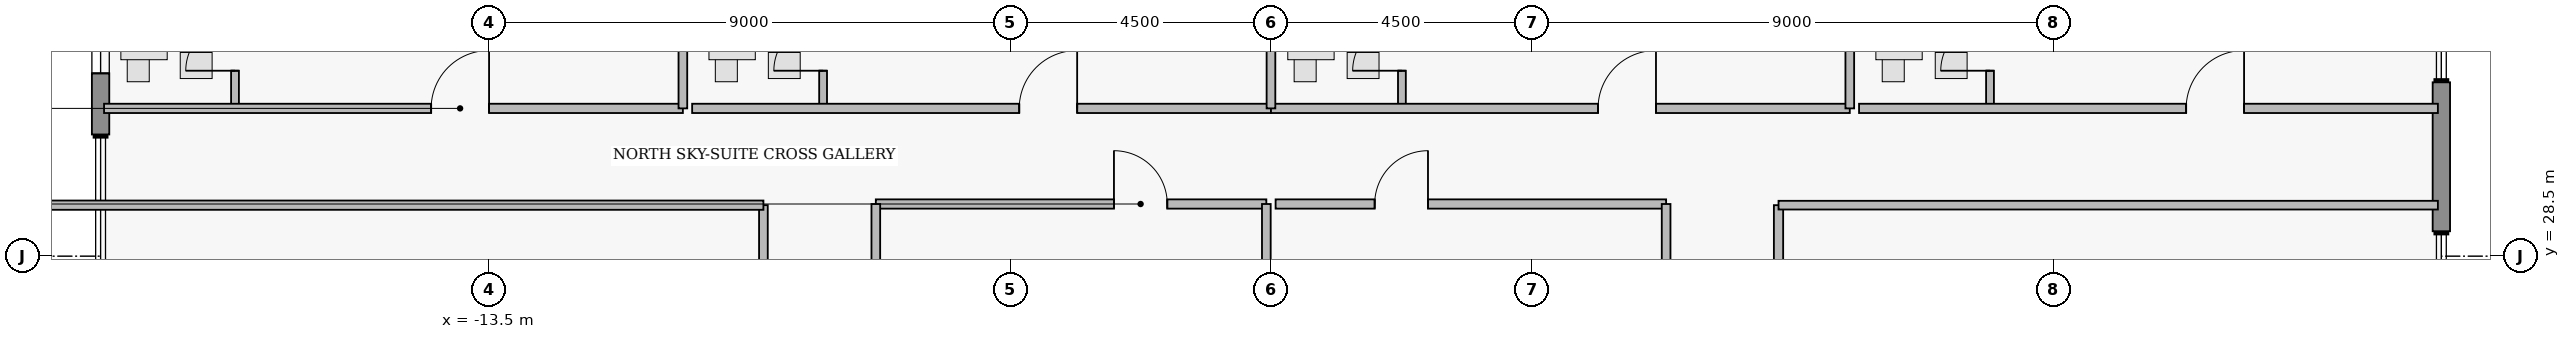
"""IFC4 building model, lengths in metres.
Left out: names, types, materials, properties, quantities, classifications, styles, units other than length and angle.
Written with IfcOpenShell. Run it as: python <this file> out.ifc"""

import sys

from ifc_helpers import new_model, si_unit, direction, frame, frame_2d, origin, place, context, subcontext, project, spatial, rectangle, extrude, element, fill, save


model = new_model("IFC4")
c1 = context("Model", 3, precision=1e-05, world=origin(), true_north=direction((0.0, 1.0)))
c2 = subcontext(c1, "Body", "Model", "MODEL_VIEW")
j1 = project(units=[si_unit("LENGTHUNIT", "METRE"), si_unit("PLANEANGLEUNIT", "RADIAN")], contexts=[c1])
p1 = place(None, origin())
s1 = spatial("IfcSite", under=j1, at=p1, CompositionType="ELEMENT")
p2 = place(p1, origin())
s2 = spatial("IfcBuilding", under=s1, at=p2, CompositionType="ELEMENT")
p3 = place(p2, frame((0.0, 0.0, 250.75)))
s3 = spatial("IfcBuildingStorey", under=s2, at=p3, CompositionType="ELEMENT", Elevation=250.75)
p4 = place(p3, frame((-20.2, 30.6, 0.0), z_axis=(0.0, 0.0, 1.0), x_axis=(0.0, 1.0, 0.0)))
e1 = element("IfcWall", 1, at=p4, inside=s3, PredefinedType="STANDARD", context=c2, shape_type="SweptSolid", body=[
    extrude(rectangle(XDim=5.0, YDim=0.3, at=frame_2d((2.5, 0.0))), origin(), (0.0, 0.0, 1.0), 3.48),
])
p5 = place(p4, frame((1.055, 0.0, 0.95)))
e2 = element("IfcOpeningElement", 2, at=p5, cuts=e1, PredefinedType="OPENING", context=c2, shape_type="SweptSolid", body=[
    extrude(rectangle(XDim=1.15, YDim=1.55, at=frame_2d((0.575, 0.775))), frame((0.0, 0.16, 0.0), z_axis=(0.0, -1.0, 0.0), x_axis=(1.0, 0.0, 0.0)), (0.0, 0.0, 1.0), 0.32),
])
p6 = place(p4, frame((3.27, 0.0, 0.95)))
e3 = element("IfcOpeningElement", 3, at=p6, cuts=e1, PredefinedType="OPENING", context=c2, shape_type="SweptSolid", body=[
    extrude(rectangle(XDim=1.15, YDim=1.55, at=frame_2d((0.575, 0.775))), frame((0.0, 0.16, 0.0), z_axis=(0.0, -1.0, 0.0), x_axis=(1.0, 0.0, 0.0)), (0.0, 0.0, 1.0), 0.32),
])
p7 = place(p3, frame((20.2, 31.5, 0.0), z_axis=(0.0, 0.0, 1.0), x_axis=(0.0, -1.0, 0.0)))
e4 = element("IfcWall", 4, at=p7, inside=s3, PredefinedType="STANDARD", context=c2, shape_type="SweptSolid", body=[
    extrude(rectangle(XDim=2.57, YDim=0.3, at=frame_2d((1.285, 0.0))), origin(), (0.0, 0.0, 1.0), 3.48),
])
p8 = place(p3, frame((-17.88, 31.05, 0.0), z_axis=(0.0, 0.0, 1.0), x_axis=(0.0, 1.0, 0.0)))
e5 = element("IfcWall", 5, at=p8, inside=s3, PredefinedType="PLUMBINGWALL", context=c2, shape_type="SweptSolid", body=[
    extrude(rectangle(XDim=2.36, YDim=0.135, at=frame_2d((1.18, 0.0))), origin(), (0.0, 0.0, 1.0), 3.48),
])
p9 = place(p8, frame((0.65, 0.0, 0.0)))
e6 = element("IfcOpeningElement", 6, at=p9, cuts=e5, PredefinedType="OPENING", context=c2, shape_type="SweptSolid", body=[
    extrude(rectangle(XDim=0.85, YDim=2.1, at=frame_2d((0.425, 1.05))), frame((0.0, 0.077, 0.0), z_axis=(0.0, -1.0, 0.0), x_axis=(1.0, 0.0, 0.0)), (0.0, 0.0, 1.0), 0.155),
])
p10 = place(p3, frame((-20.14, 31.05, 0.0), z_axis=(0.0, 0.0, 1.0), x_axis=(1.0, 0.0, 0.0)))
e7 = element("IfcWall", 7, at=p10, inside=s3, PredefinedType="PARTITIONING", context=c2, shape_type="SweptSolid", body=[
    extrude(rectangle(XDim=9.99, YDim=0.16, at=frame_2d((4.995, 0.0))), origin(), (0.0, 0.0, 1.0), 3.48),
])
p11 = place(p10, frame((5.645, 0.0, 0.0)))
e8 = element("IfcOpeningElement", 8, at=p11, cuts=e7, PredefinedType="OPENING", context=c2, shape_type="SweptSolid", body=[
    extrude(rectangle(XDim=1.0, YDim=2.15, at=frame_2d((0.5, 1.075))), frame((0.0, 0.09, 0.0), z_axis=(0.0, -1.0, 0.0), x_axis=(1.0, 0.0, 0.0)), (0.0, 0.0, 1.0), 0.18),
])
p12 = place(p3, frame((-7.73, 31.05, 0.0), z_axis=(0.0, 0.0, 1.0), x_axis=(0.0, 1.0, 0.0)))
e9 = element("IfcWall", 9, at=p12, inside=s3, PredefinedType="PLUMBINGWALL", context=c2, shape_type="SweptSolid", body=[
    extrude(rectangle(XDim=2.36, YDim=0.135, at=frame_2d((1.18, 0.0))), origin(), (0.0, 0.0, 1.0), 3.48),
])
p13 = place(p12, frame((0.65, 0.0, 0.0)))
e10 = element("IfcOpeningElement", 10, at=p13, cuts=e9, PredefinedType="OPENING", context=c2, shape_type="SweptSolid", body=[
    extrude(rectangle(XDim=0.85, YDim=2.1, at=frame_2d((0.425, 1.05))), frame((0.0, 0.077, 0.0), z_axis=(0.0, -1.0, 0.0), x_axis=(1.0, 0.0, 0.0)), (0.0, 0.0, 1.0), 0.155),
])
p14 = place(p3, frame((-9.99, 31.05, 0.0), z_axis=(0.0, 0.0, 1.0), x_axis=(1.0, 0.0, 0.0)))
e11 = element("IfcWall", 11, at=p14, inside=s3, PredefinedType="PARTITIONING", context=c2, shape_type="SweptSolid", body=[
    extrude(rectangle(XDim=9.99, YDim=0.16, at=frame_2d((4.995, 0.0))), origin(), (0.0, 0.0, 1.0), 3.48),
])
p15 = place(p14, frame((5.645, 0.0, 0.0)))
e12 = element("IfcOpeningElement", 12, at=p15, cuts=e11, PredefinedType="OPENING", context=c2, shape_type="SweptSolid", body=[
    extrude(rectangle(XDim=1.0, YDim=2.15, at=frame_2d((0.5, 1.075))), frame((0.0, 0.09, 0.0), z_axis=(0.0, -1.0, 0.0), x_axis=(1.0, 0.0, 0.0)), (0.0, 0.0, 1.0), 0.18),
])
p16 = place(p3, frame((2.26, 31.05, 0.0), z_axis=(0.0, 0.0, 1.0), x_axis=(0.0, 1.0, 0.0)))
e13 = element("IfcWall", 13, at=p16, inside=s3, PredefinedType="PLUMBINGWALL", context=c2, shape_type="SweptSolid", body=[
    extrude(rectangle(XDim=2.36, YDim=0.135, at=frame_2d((1.18, 0.0))), origin(), (0.0, 0.0, 1.0), 3.48),
])
p17 = place(p16, frame((0.65, 0.0, 0.0)))
e14 = element("IfcOpeningElement", 14, at=p17, cuts=e13, PredefinedType="OPENING", context=c2, shape_type="SweptSolid", body=[
    extrude(rectangle(XDim=0.85, YDim=2.1, at=frame_2d((0.425, 1.05))), frame((0.0, 0.077, 0.0), z_axis=(0.0, -1.0, 0.0), x_axis=(1.0, 0.0, 0.0)), (0.0, 0.0, 1.0), 0.155),
])
p18 = place(p3, frame((0.0, 31.05, 0.0), z_axis=(0.0, 0.0, 1.0), x_axis=(1.0, 0.0, 0.0)))
e15 = element("IfcWall", 15, at=p18, inside=s3, PredefinedType="PARTITIONING", context=c2, shape_type="SweptSolid", body=[
    extrude(rectangle(XDim=9.99, YDim=0.16, at=frame_2d((4.995, 0.0))), origin(), (0.0, 0.0, 1.0), 3.48),
])
p19 = place(p18, frame((5.645, 0.0, 0.0)))
e16 = element("IfcOpeningElement", 16, at=p19, cuts=e15, PredefinedType="OPENING", context=c2, shape_type="SweptSolid", body=[
    extrude(rectangle(XDim=1.0, YDim=2.15, at=frame_2d((0.5, 1.075))), frame((0.0, 0.09, 0.0), z_axis=(0.0, -1.0, 0.0), x_axis=(1.0, 0.0, 0.0)), (0.0, 0.0, 1.0), 0.18),
])
p20 = place(p3, frame((12.41, 31.05, 0.0), z_axis=(0.0, 0.0, 1.0), x_axis=(0.0, 1.0, 0.0)))
e17 = element("IfcWall", 17, at=p20, inside=s3, PredefinedType="PLUMBINGWALL", context=c2, shape_type="SweptSolid", body=[
    extrude(rectangle(XDim=2.36, YDim=0.135, at=frame_2d((1.18, 0.0))), origin(), (0.0, 0.0, 1.0), 3.48),
])
p21 = place(p20, frame((0.65, 0.0, 0.0)))
e18 = element("IfcOpeningElement", 18, at=p21, cuts=e17, PredefinedType="OPENING", context=c2, shape_type="SweptSolid", body=[
    extrude(rectangle(XDim=0.85, YDim=2.1, at=frame_2d((0.425, 1.05))), frame((0.0, 0.077, 0.0), z_axis=(0.0, -1.0, 0.0), x_axis=(1.0, 0.0, 0.0)), (0.0, 0.0, 1.0), 0.155),
])
p22 = place(p3, frame((10.15, 31.05, 0.0), z_axis=(0.0, 0.0, 1.0), x_axis=(1.0, 0.0, 0.0)))
e19 = element("IfcWall", 19, at=p22, inside=s3, PredefinedType="PARTITIONING", context=c2, shape_type="SweptSolid", body=[
    extrude(rectangle(XDim=9.99, YDim=0.16, at=frame_2d((4.995, 0.0))), origin(), (0.0, 0.0, 1.0), 3.48),
])
p23 = place(p22, frame((5.645, 0.0, 0.0)))
e20 = element("IfcOpeningElement", 20, at=p23, cuts=e19, PredefinedType="OPENING", context=c2, shape_type="SweptSolid", body=[
    extrude(rectangle(XDim=1.0, YDim=2.15, at=frame_2d((0.5, 1.075))), frame((0.0, 0.09, 0.0), z_axis=(0.0, -1.0, 0.0), x_axis=(1.0, 0.0, 0.0)), (0.0, 0.0, 1.0), 0.18),
])
p24 = place(p3, frame((-6.82, 29.4, 0.0), z_axis=(0.0, 0.0, 1.0), x_axis=(1.0, 0.0, 0.0)))
e21 = element("IfcWall", 21, at=p24, inside=s3, PredefinedType="PARTITIONING", context=c2, shape_type="SweptSolid", body=[
    extrude(rectangle(XDim=6.74, YDim=0.16, at=frame_2d((3.37, 0.0))), origin(), (0.0, 0.0, 1.0), 3.48),
])
p25 = place(p24, frame((4.11, 0.0, 0.0)))
e22 = element("IfcOpeningElement", 22, at=p25, cuts=e21, PredefinedType="OPENING", context=c2, shape_type="SweptSolid", body=[
    extrude(rectangle(XDim=0.92, YDim=2.12, at=frame_2d((0.46, 1.06))), frame((0.0, 0.09, 0.0), z_axis=(0.0, -1.0, 0.0), x_axis=(1.0, 0.0, 0.0)), (0.0, 0.0, 1.0), 0.18),
])
p26 = place(p3, frame((0.08, 29.4, 0.0), z_axis=(0.0, 0.0, 1.0), x_axis=(1.0, 0.0, 0.0)))
e23 = element("IfcWall", 23, at=p26, inside=s3, PredefinedType="PARTITIONING", context=c2, shape_type="SweptSolid", body=[
    extrude(rectangle(XDim=6.74, YDim=0.16, at=frame_2d((3.37, 0.0))), origin(), (0.0, 0.0, 1.0), 3.48),
])
p27 = place(p26, frame((1.71, 0.0, 0.0)))
e24 = element("IfcOpeningElement", 24, at=p27, cuts=e23, PredefinedType="OPENING", context=c2, shape_type="SweptSolid", body=[
    extrude(rectangle(XDim=0.92, YDim=2.12, at=frame_2d((0.46, 1.06))), frame((0.0, 0.09, 0.0), z_axis=(0.0, -1.0, 0.0), x_axis=(1.0, 0.0, 0.0)), (0.0, 0.0, 1.0), 0.18),
])
p28 = place(p3, frame((8.76, 23.81, 0.0), z_axis=(0.0, 0.0, 1.0), x_axis=(0.0, 1.0, 0.0)))
e25 = element("IfcWall", 25, at=p28, inside=s3, PredefinedType="PARTITIONING", context=c2, shape_type="SweptSolid", body=[
    extrude(rectangle(XDim=5.57, YDim=0.16, at=frame_2d((2.785, 0.0))), origin(), (0.0, 0.0, 1.0), 3.48),
])
p29 = place(p28, frame((2.245, 0.0, 0.0)))
e26 = element("IfcOpeningElement", 26, at=p29, cuts=e25, PredefinedType="OPENING", context=c2, shape_type="SweptSolid", body=[
    extrude(rectangle(XDim=1.08, YDim=2.18, at=frame_2d((0.54, 1.09))), frame((0.0, 0.09, 0.0), z_axis=(0.0, -1.0, 0.0), x_axis=(1.0, 0.0, 0.0)), (0.0, 0.0, 1.0), 0.18),
])
for number, where, z_axis, x_axis in (
    (27, (-10.15, 31.05, 0.0), (0.0, 0.0, 1.0), (0.0, 1.0, 0.0)),
    (28, (0.0, 31.05, 0.0), (0.0, 0.0, 1.0), (0.0, 1.0, 0.0)),
    (29, (9.99, 31.05, 0.0), (0.0, 0.0, 1.0), (0.0, 1.0, 0.0)),
):
    element("IfcWall", number, at=place(p3, frame(where, z_axis=z_axis, x_axis=x_axis)), inside=s3, PredefinedType="PARTITIONING", context=c2, shape_type="SweptSolid", body=[
        extrude(rectangle(XDim=7.87, YDim=0.15, at=frame_2d((3.935, 0.0))), origin(), (0.0, 0.0, 1.0), 3.48),
    ])
for number, where, z_axis, x_axis in (
    (30, (-6.82, 27.0, 0.0), (0.0, 0.0, 1.0), (0.0, 1.0, 0.0)),
    (31, (-0.08, 27.0, 0.0), (0.0, 0.0, 1.0), (0.0, 1.0, 0.0)),
    (32, (6.82, 27.0, 0.0), (0.0, 0.0, 1.0), (0.0, 1.0, 0.0)),
):
    element("IfcWall", number, at=place(p3, frame(where, z_axis=z_axis, x_axis=x_axis)), inside=s3, PredefinedType="PARTITIONING", context=c2, shape_type="SweptSolid", body=[
        extrude(rectangle(XDim=2.4, YDim=0.15, at=frame_2d((1.2, 0.0))), origin(), (0.0, 0.0, 1.0), 3.48),
    ])
p30 = place(p3, frame((-8.76, 16.7, 0.0), z_axis=(0.0, 0.0, 1.0), x_axis=(0.0, 1.0, 0.0)))
e33 = element("IfcWall", 33, at=p30, inside=s3, PredefinedType="PARTITIONING", context=c2, shape_type="SweptSolid", body=[
    extrude(rectangle(XDim=12.68, YDim=0.15, at=frame_2d((6.34, 0.0))), origin(), (0.0, 0.0, 1.0), 3.48),
])
p31 = place(p3, frame((-22.64, 29.38, 0.0), z_axis=(0.0, 0.0, 1.0), x_axis=(1.0, 0.0, 0.0)))
e34 = element("IfcWall", 34, at=p31, inside=s3, PredefinedType="PARTITIONING", context=c2, shape_type="SweptSolid", body=[
    extrude(rectangle(XDim=13.88, YDim=0.16, at=frame_2d((6.94, 0.0))), origin(), (0.0, 0.0, 1.0), 3.48),
])
p32 = place(p3, frame((8.76, 29.38, 0.0), z_axis=(0.0, 0.0, 1.0), x_axis=(1.0, 0.0, 0.0)))
e35 = element("IfcWall", 35, at=p32, inside=s3, PredefinedType="PARTITIONING", context=c2, shape_type="SweptSolid", body=[
    extrude(rectangle(XDim=11.38, YDim=0.15, at=frame_2d((5.69, 0.0))), origin(), (0.0, 0.0, 1.0), 3.48),
])
p33 = place(p5, origin())
e36 = element("IfcWindow", 36, at=p33, inside=s3, PartitioningType="SINGLE_PANEL", PredefinedType="WINDOW", context=c2, shape_type="SweptSolid", body=[
    extrude(rectangle(XDim=1.15, YDim=1.55, at=frame_2d((0.575, 0.775))), frame((0.0, 0.03, 0.0), z_axis=(0.0, -1.0, 0.0), x_axis=(1.0, 0.0, 0.0)), (0.0, 0.0, 1.0), 0.06),
])
fill(e2, e36)
p34 = place(p9, origin())
e37 = element("IfcDoor", 37, at=p34, inside=s3, OperationType="SINGLE_SWING_LEFT", PredefinedType="DOOR", context=c2, shape_type="SweptSolid", body=[
    extrude(rectangle(XDim=0.85, YDim=2.1, at=frame_2d((0.425, 1.05))), frame((0.0, 0.025, 0.0), z_axis=(0.0, -1.0, 0.0), x_axis=(1.0, 0.0, 0.0)), (0.0, 0.0, 1.0), 0.05),
])
fill(e6, e37)
p35 = place(p11, origin())
e38 = element("IfcDoor", 38, at=p35, inside=s3, OperationType="SINGLE_SWING_RIGHT", PredefinedType="DOOR", context=c2, shape_type="SweptSolid", body=[
    extrude(rectangle(XDim=1.0, YDim=2.15, at=frame_2d((0.5, 1.075))), frame((0.0, 0.025, 0.0), z_axis=(0.0, -1.0, 0.0), x_axis=(1.0, 0.0, 0.0)), (0.0, 0.0, 1.0), 0.05),
])
fill(e8, e38)
p36 = place(p13, origin())
e39 = element("IfcDoor", 39, at=p36, inside=s3, OperationType="SINGLE_SWING_LEFT", PredefinedType="DOOR", context=c2, shape_type="SweptSolid", body=[
    extrude(rectangle(XDim=0.85, YDim=2.1, at=frame_2d((0.425, 1.05))), frame((0.0, 0.025, 0.0), z_axis=(0.0, -1.0, 0.0), x_axis=(1.0, 0.0, 0.0)), (0.0, 0.0, 1.0), 0.05),
])
fill(e10, e39)
p37 = place(p15, origin())
e40 = element("IfcDoor", 40, at=p37, inside=s3, OperationType="SINGLE_SWING_RIGHT", PredefinedType="DOOR", context=c2, shape_type="SweptSolid", body=[
    extrude(rectangle(XDim=1.0, YDim=2.15, at=frame_2d((0.5, 1.075))), frame((0.0, 0.025, 0.0), z_axis=(0.0, -1.0, 0.0), x_axis=(1.0, 0.0, 0.0)), (0.0, 0.0, 1.0), 0.05),
])
fill(e12, e40)
p38 = place(p17, origin())
e41 = element("IfcDoor", 41, at=p38, inside=s3, OperationType="SINGLE_SWING_LEFT", PredefinedType="DOOR", context=c2, shape_type="SweptSolid", body=[
    extrude(rectangle(XDim=0.85, YDim=2.1, at=frame_2d((0.425, 1.05))), frame((0.0, 0.025, 0.0), z_axis=(0.0, -1.0, 0.0), x_axis=(1.0, 0.0, 0.0)), (0.0, 0.0, 1.0), 0.05),
])
fill(e14, e41)
p39 = place(p19, origin())
e42 = element("IfcDoor", 42, at=p39, inside=s3, OperationType="SINGLE_SWING_RIGHT", PredefinedType="DOOR", context=c2, shape_type="SweptSolid", body=[
    extrude(rectangle(XDim=1.0, YDim=2.15, at=frame_2d((0.5, 1.075))), frame((0.0, 0.025, 0.0), z_axis=(0.0, -1.0, 0.0), x_axis=(1.0, 0.0, 0.0)), (0.0, 0.0, 1.0), 0.05),
])
fill(e16, e42)
p40 = place(p21, origin())
e43 = element("IfcDoor", 43, at=p40, inside=s3, OperationType="SINGLE_SWING_LEFT", PredefinedType="DOOR", context=c2, shape_type="SweptSolid", body=[
    extrude(rectangle(XDim=0.85, YDim=2.1, at=frame_2d((0.425, 1.05))), frame((0.0, 0.025, 0.0), z_axis=(0.0, -1.0, 0.0), x_axis=(1.0, 0.0, 0.0)), (0.0, 0.0, 1.0), 0.05),
])
fill(e18, e43)
p41 = place(p23, origin())
e44 = element("IfcDoor", 44, at=p41, inside=s3, OperationType="SINGLE_SWING_RIGHT", PredefinedType="DOOR", context=c2, shape_type="SweptSolid", body=[
    extrude(rectangle(XDim=1.0, YDim=2.15, at=frame_2d((0.5, 1.075))), frame((0.0, 0.025, 0.0), z_axis=(0.0, -1.0, 0.0), x_axis=(1.0, 0.0, 0.0)), (0.0, 0.0, 1.0), 0.05),
])
fill(e20, e44)
p42 = place(p25, origin())
e45 = element("IfcDoor", 45, at=p42, inside=s3, OperationType="SINGLE_SWING_LEFT", PredefinedType="DOOR", context=c2, shape_type="SweptSolid", body=[
    extrude(rectangle(XDim=0.92, YDim=2.12, at=frame_2d((0.46, 1.06))), frame((0.0, 0.025, 0.0), z_axis=(0.0, -1.0, 0.0), x_axis=(1.0, 0.0, 0.0)), (0.0, 0.0, 1.0), 0.05),
])
fill(e22, e45)
p43 = place(p27, origin())
e46 = element("IfcDoor", 46, at=p43, inside=s3, OperationType="SINGLE_SWING_RIGHT", PredefinedType="DOOR", context=c2, shape_type="SweptSolid", body=[
    extrude(rectangle(XDim=0.92, YDim=2.12, at=frame_2d((0.46, 1.06))), frame((0.0, 0.025, 0.0), z_axis=(0.0, -1.0, 0.0), x_axis=(1.0, 0.0, 0.0)), (0.0, 0.0, 1.0), 0.05),
])
fill(e24, e46)
save(model, sys.argv[1])
